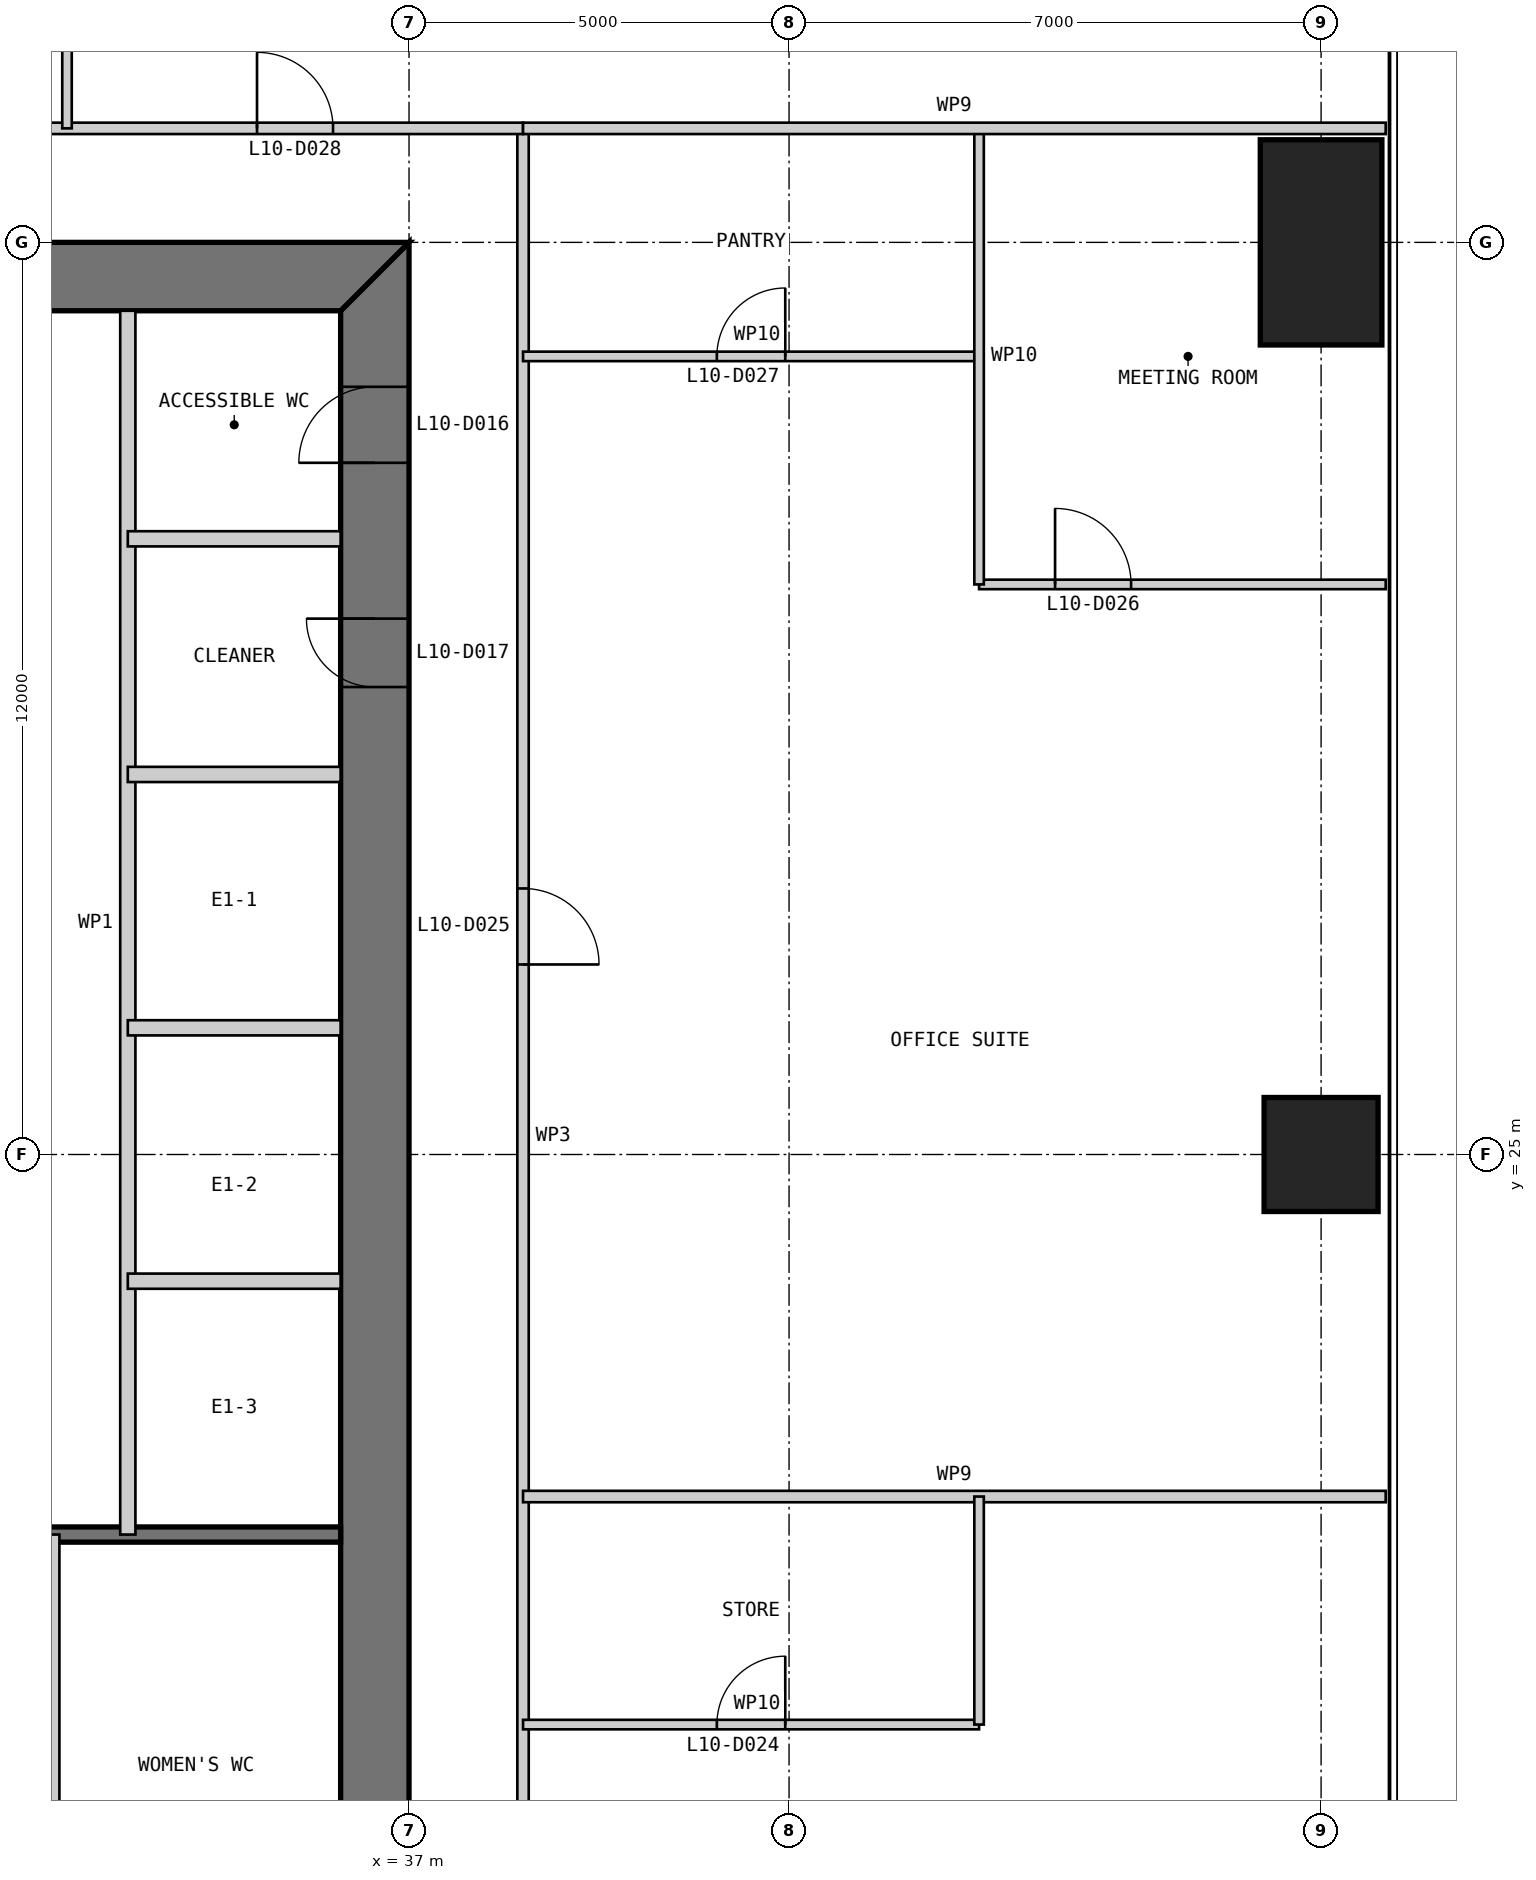
"""IFC4 building model, lengths in metres.
Left out: names, types, materials, properties, quantities, classifications, styles, units other than length and angle.
Written with IfcOpenShell. Run it as: python <this file> out.ifc"""

import sys

from ifc_helpers import new_model, si_unit, direction, frame, frame_2d, origin, origin_2d, place, context, subcontext, project, spatial, polyline, rectangle, outline, extrude, element, fill, save


model = new_model("IFC4")
c1 = context("Model", 3, precision=1e-05, world=origin(), true_north=direction((0.0, 1.0)))
c2 = subcontext(c1, "Body", "Model", "MODEL_VIEW")
j1 = project(units=[si_unit("LENGTHUNIT", "METRE"), si_unit("PLANEANGLEUNIT", "RADIAN")], contexts=[c1])
p1 = place(None, origin())
s1 = spatial("IfcSite", under=j1, at=p1, CompositionType="ELEMENT")
p2 = place(p1, origin())
s2 = spatial("IfcBuilding", under=s1, at=p2, CompositionType="ELEMENT")
p3 = place(p2, frame((0.0, 0.0, 47.0)))
s3 = spatial("IfcBuildingStorey", under=s2, at=p3, CompositionType="ELEMENT", Elevation=47.0)
p4 = place(p3, frame((49.0, 25.0, 0.0), z_axis=(0.0, 0.0, 1.0), x_axis=(1.0, 0.0, 0.0)))
e1 = element("IfcColumn", 1, at=p4, inside=s3, PredefinedType="COLUMN", context=c2, shape_type="SweptSolid", body=[
    extrude(rectangle(XDim=1.5, YDim=1.5, at=origin_2d()), origin(), (0.0, 0.0, 1.0), 4.0),
])
p5 = place(p3, frame((49.0, 37.0, 0.0), z_axis=(0.0, 0.0, 1.0), x_axis=(1.0, 0.0, 0.0)))
e2 = element("IfcColumn", 2, at=p5, inside=s3, PredefinedType="COLUMN", context=c2, shape_type="SweptSolid", body=[
    extrude(rectangle(XDim=1.6, YDim=2.7, at=origin_2d()), origin(), (0.0, 0.0, 1.0), 4.0),
])
p6 = place(p3, frame((36.55, 13.9, 0.0), z_axis=(0.0, 0.0, 1.0), x_axis=(0.0, 1.0, 0.0)))
e3 = element("IfcWall", 3, at=p6, inside=s3, PredefinedType="SHEAR", context=c2, shape_type="SweptSolid", body=[
    extrude(outline(polyline([(-0.9, -0.45), (23.1, -0.45), (22.2, 0.45), (0.0, 0.45), (-0.9, -0.45)])), origin(), (0.0, 0.0, 1.0), 4.0),
])
p7 = place(p6, frame((20.2, 0.0, 0.0)))
e4 = element("IfcOpeningElement", 4, at=p7, cuts=e3, PredefinedType="OPENING", context=c2, shape_type="SweptSolid", body=[
    extrude(rectangle(XDim=1.0, YDim=2.2, at=frame_2d((0.5, 1.1))), frame((0.0, 0.46, 0.0), z_axis=(0.0, -1.0, 0.0), x_axis=(1.0, 0.0, 0.0)), (0.0, 0.0, 1.0), 0.92),
])
p8 = place(p6, frame((17.25, 0.0, 0.0)))
e5 = element("IfcOpeningElement", 5, at=p8, cuts=e3, PredefinedType="OPENING", context=c2, shape_type="SweptSolid", body=[
    extrude(rectangle(XDim=0.9, YDim=2.2, at=frame_2d((0.45, 1.1))), frame((0.0, 0.46, 0.0), z_axis=(0.0, -1.0, 0.0), x_axis=(1.0, 0.0, 0.0)), (0.0, 0.0, 1.0), 0.92),
])
p9 = place(p3, frame((37.0, 36.55, 0.0), z_axis=(0.0, 0.0, 1.0), x_axis=(-1.0, 0.0, 0.0)))
e6 = element("IfcWall", 6, at=p9, inside=s3, PredefinedType="SHEAR", context=c2, shape_type="SweptSolid", body=[
    extrude(outline(polyline([(0.0, -0.45), (24.0, -0.45), (23.1, 0.45), (0.9, 0.45), (0.0, -0.45)])), origin(), (0.0, 0.0, 1.0), 4.0),
])
p10 = place(p9, frame((4.9, 0.0, 0.0)))
e7 = element("IfcOpeningElement", 7, at=p10, cuts=e6, PredefinedType="OPENING", context=c2, shape_type="SweptSolid", body=[
    extrude(rectangle(XDim=1.0, YDim=2.2, at=frame_2d((0.5, 1.1))), frame((0.0, 0.46, 0.0), z_axis=(0.0, -1.0, 0.0), x_axis=(1.0, 0.0, 0.0)), (0.0, 0.0, 1.0), 0.92),
])
p11 = place(p9, frame((8.9, 0.0, 0.0)))
e8 = element("IfcOpeningElement", 8, at=p11, cuts=e6, PredefinedType="OPENING", context=c2, shape_type="SweptSolid", body=[
    extrude(rectangle(XDim=1.1, YDim=2.2, at=frame_2d((0.55, 1.1))), frame((0.0, 0.46, 0.0), z_axis=(0.0, -1.0, 0.0), x_axis=(1.0, 0.0, 0.0)), (0.0, 0.0, 1.0), 0.92),
])
p12 = place(p9, frame((15.05, 0.0, 0.0)))
e9 = element("IfcOpeningElement", 9, at=p12, cuts=e6, PredefinedType="OPENING", context=c2, shape_type="SweptSolid", body=[
    extrude(rectangle(XDim=0.9, YDim=2.2, at=frame_2d((0.45, 1.1))), frame((0.0, 0.46, 0.0), z_axis=(0.0, -1.0, 0.0), x_axis=(1.0, 0.0, 0.0)), (0.0, 0.0, 1.0), 0.92),
])
p13 = place(p9, frame((17.9, 0.0, 0.0)))
e10 = element("IfcOpeningElement", 10, at=p13, cuts=e6, PredefinedType="OPENING", context=c2, shape_type="SweptSolid", body=[
    extrude(rectangle(XDim=1.0, YDim=2.2, at=frame_2d((0.5, 1.1))), frame((0.0, 0.46, 0.0), z_axis=(0.0, -1.0, 0.0), x_axis=(1.0, 0.0, 0.0)), (0.0, 0.0, 1.0), 0.92),
])
p14 = place(p9, frame((21.4, 0.0, 0.0)))
e11 = element("IfcOpeningElement", 11, at=p14, cuts=e6, PredefinedType="OPENING", context=c2, shape_type="SweptSolid", body=[
    extrude(rectangle(XDim=1.0, YDim=2.2, at=frame_2d((0.5, 1.1))), frame((0.0, 0.46, 0.0), z_axis=(0.0, -1.0, 0.0), x_axis=(1.0, 0.0, 0.0)), (0.0, 0.0, 1.0), 0.92),
])
p15 = place(p3, frame((20.3, 20.0, 0.0), z_axis=(0.0, 0.0, 1.0), x_axis=(1.0, 0.0, 0.0)))
e12 = element("IfcWall", 12, at=p15, inside=s3, PredefinedType="SOLIDWALL", context=c2, shape_type="SweptSolid", body=[
    extrude(rectangle(XDim=15.8, YDim=0.2, at=frame_2d((7.9, 0.0))), origin(), (0.0, 0.0, 1.0), 3.8),
])
p16 = place(p3, frame((32.3, 13.9, 0.0), z_axis=(0.0, 0.0, 1.0), x_axis=(0.0, 1.0, 0.0)))
e13 = element("IfcWall", 13, at=p16, inside=s3, PredefinedType="PARTITIONING", context=c2, shape_type="SweptSolid", body=[
    extrude(rectangle(XDim=6.1, YDim=0.2, at=frame_2d((3.05, 0.0))), origin(), (0.0, 0.0, 1.0), 3.8),
])
p17 = place(p3, frame((33.3, 36.1, 0.0), z_axis=(0.0, 0.0, 1.0), x_axis=(0.0, -1.0, 0.0)))
e14 = element("IfcWall", 14, at=p17, inside=s3, PredefinedType="PARTITIONING", context=c2, shape_type="SweptSolid", body=[
    extrude(rectangle(XDim=16.1, YDim=0.2, at=frame_2d((8.05, 0.0))), origin(), (0.0, 0.0, 1.0), 3.8),
])
for number, where, z_axis, x_axis in (
    (15, (36.1, 30.0, 0.0), (0.0, 0.0, 1.0), (-1.0, 0.0, 0.0)),
    (16, (36.1, 26.667, 0.0), (0.0, 0.0, 1.0), (-1.0, 0.0, 0.0)),
    (17, (36.1, 23.333, 0.0), (0.0, 0.0, 1.0), (-1.0, 0.0, 0.0)),
    (18, (36.1, 33.1, 0.0), (0.0, 0.0, 1.0), (-1.0, 0.0, 0.0)),
):
    element("IfcWall", number, at=place(p3, frame(where, z_axis=z_axis, x_axis=x_axis)), inside=s3, PredefinedType="PARTITIONING", context=c2, shape_type="SweptSolid", body=[
        extrude(rectangle(XDim=2.8, YDim=0.2, at=frame_2d((1.4, 0.0))), origin(), (0.0, 0.0, 1.0), 3.8),
    ])
p18 = place(p3, frame((38.5, 11.5, 0.0), z_axis=(0.0, 0.0, 1.0), x_axis=(0.0, 1.0, 0.0)))
e19 = element("IfcWall", 19, at=p18, inside=s3, PredefinedType="PARTITIONING", context=c2, shape_type="SweptSolid", body=[
    extrude(rectangle(XDim=27.0, YDim=0.15, at=frame_2d((13.5, 0.0))), origin(), (0.0, 0.0, 1.0), 3.85),
])
p19 = place(p18, frame((2.5, 0.0, 0.0)))
e20 = element("IfcOpeningElement", 20, at=p19, cuts=e19, PredefinedType="OPENING", context=c2, shape_type="SweptSolid", body=[
    extrude(rectangle(XDim=1.0, YDim=2.2, at=frame_2d((0.5, 1.1))), frame((0.0, 0.085, 0.0), z_axis=(0.0, -1.0, 0.0), x_axis=(1.0, 0.0, 0.0)), (0.0, 0.0, 1.0), 0.17),
])
p20 = place(p18, frame((16.0, 0.0, 0.0)))
e21 = element("IfcOpeningElement", 21, at=p20, cuts=e19, PredefinedType="OPENING", context=c2, shape_type="SweptSolid", body=[
    extrude(rectangle(XDim=1.0, YDim=2.2, at=frame_2d((0.5, 1.1))), frame((0.0, 0.085, 0.0), z_axis=(0.0, -1.0, 0.0), x_axis=(1.0, 0.0, 0.0)), (0.0, 0.0, 1.0), 0.17),
])
p21 = place(p3, frame((44.5, 17.5, 0.0), z_axis=(0.0, 0.0, 1.0), x_axis=(-1.0, 0.0, 0.0)))
e22 = element("IfcWall", 22, at=p21, inside=s3, PredefinedType="PARTITIONING", context=c2, shape_type="SweptSolid", body=[
    extrude(rectangle(XDim=6.0, YDim=0.125, at=frame_2d((3.0, 0.0))), origin(), (0.0, 0.0, 1.0), 3.85),
])
p22 = place(p21, frame((2.55, 0.0, 0.0)))
e23 = element("IfcOpeningElement", 23, at=p22, cuts=e22, PredefinedType="OPENING", context=c2, shape_type="SweptSolid", body=[
    extrude(rectangle(XDim=0.9, YDim=2.2, at=frame_2d((0.45, 1.1))), frame((0.0, 0.073, 0.0), z_axis=(0.0, -1.0, 0.0), x_axis=(1.0, 0.0, 0.0)), (0.0, 0.0, 1.0), 0.145),
])
p23 = place(p3, frame((49.85, 20.5, 0.0), z_axis=(0.0, 0.0, 1.0), x_axis=(-1.0, 0.0, 0.0)))
e24 = element("IfcWall", 24, at=p23, inside=s3, PredefinedType="PARTITIONING", context=c2, shape_type="SweptSolid", body=[
    extrude(rectangle(XDim=11.35, YDim=0.15, at=frame_2d((5.675, 0.0))), origin(), (0.0, 0.0, 1.0), 3.85),
])
p24 = place(p3, frame((49.85, 32.5, 0.0), z_axis=(0.0, 0.0, 1.0), x_axis=(-1.0, 0.0, 0.0)))
e25 = element("IfcWall", 25, at=p24, inside=s3, PredefinedType="PARTITIONING", context=c2, shape_type="SweptSolid", body=[
    extrude(rectangle(XDim=5.35, YDim=0.125, at=frame_2d((2.675, 0.0))), origin(), (0.0, 0.0, 1.0), 3.85),
])
p25 = place(p24, frame((3.35, 0.0, 0.0)))
e26 = element("IfcOpeningElement", 26, at=p25, cuts=e25, PredefinedType="OPENING", context=c2, shape_type="SweptSolid", body=[
    extrude(rectangle(XDim=1.0, YDim=2.2, at=frame_2d((0.5, 1.1))), frame((0.0, 0.073, 0.0), z_axis=(0.0, -1.0, 0.0), x_axis=(1.0, 0.0, 0.0)), (0.0, 0.0, 1.0), 0.145),
])
p26 = place(p3, frame((44.5, 35.5, 0.0), z_axis=(0.0, 0.0, 1.0), x_axis=(-1.0, 0.0, 0.0)))
e27 = element("IfcWall", 27, at=p26, inside=s3, PredefinedType="PARTITIONING", context=c2, shape_type="SweptSolid", body=[
    extrude(rectangle(XDim=6.0, YDim=0.125, at=frame_2d((3.0, 0.0))), origin(), (0.0, 0.0, 1.0), 3.85),
])
p27 = place(p26, frame((2.55, 0.0, 0.0)))
e28 = element("IfcOpeningElement", 28, at=p27, cuts=e27, PredefinedType="OPENING", context=c2, shape_type="SweptSolid", body=[
    extrude(rectangle(XDim=0.9, YDim=2.2, at=frame_2d((0.45, 1.1))), frame((0.0, 0.073, 0.0), z_axis=(0.0, -1.0, 0.0), x_axis=(1.0, 0.0, 0.0)), (0.0, 0.0, 1.0), 0.145),
])
p28 = place(p3, frame((44.5, 17.5, 0.0), z_axis=(0.0, 0.0, 1.0), x_axis=(0.0, 1.0, 0.0)))
e29 = element("IfcWall", 29, at=p28, inside=s3, PredefinedType="PARTITIONING", context=c2, shape_type="SweptSolid", body=[
    extrude(rectangle(XDim=3.0, YDim=0.125, at=frame_2d((1.5, 0.0))), origin(), (0.0, 0.0, 1.0), 3.85),
])
p29 = place(p3, frame((44.5, 32.5, 0.0), z_axis=(0.0, 0.0, 1.0), x_axis=(0.0, 1.0, 0.0)))
e30 = element("IfcWall", 30, at=p29, inside=s3, PredefinedType="PARTITIONING", context=c2, shape_type="SweptSolid", body=[
    extrude(rectangle(XDim=6.0, YDim=0.125, at=frame_2d((3.0, 0.0))), origin(), (0.0, 0.0, 1.0), 3.85),
])
p30 = place(p3, frame((38.5, 38.5, 0.0), z_axis=(0.0, 0.0, 1.0), x_axis=(-1.0, 0.0, 0.0)))
e31 = element("IfcWall", 31, at=p30, inside=s3, PredefinedType="PARTITIONING", context=c2, shape_type="SweptSolid", body=[
    extrude(rectangle(XDim=27.0, YDim=0.15, at=frame_2d((13.5, 0.0))), origin(), (0.0, 0.0, 1.0), 3.85),
])
p31 = place(p30, frame((2.5, 0.0, 0.0)))
e32 = element("IfcOpeningElement", 32, at=p31, cuts=e31, PredefinedType="OPENING", context=c2, shape_type="SweptSolid", body=[
    extrude(rectangle(XDim=1.0, YDim=2.2, at=frame_2d((0.5, 1.1))), frame((0.0, 0.085, 0.0), z_axis=(0.0, -1.0, 0.0), x_axis=(1.0, 0.0, 0.0)), (0.0, 0.0, 1.0), 0.17),
])
p32 = place(p30, frame((16.0, 0.0, 0.0)))
e33 = element("IfcOpeningElement", 33, at=p32, cuts=e31, PredefinedType="OPENING", context=c2, shape_type="SweptSolid", body=[
    extrude(rectangle(XDim=1.0, YDim=2.2, at=frame_2d((0.5, 1.1))), frame((0.0, 0.085, 0.0), z_axis=(0.0, -1.0, 0.0), x_axis=(1.0, 0.0, 0.0)), (0.0, 0.0, 1.0), 0.17),
])
p33 = place(p3, frame((49.85, 38.5, 0.0), z_axis=(0.0, 0.0, 1.0), x_axis=(-1.0, 0.0, 0.0)))
e34 = element("IfcWall", 34, at=p33, inside=s3, PredefinedType="PARTITIONING", context=c2, shape_type="SweptSolid", body=[
    extrude(rectangle(XDim=11.35, YDim=0.15, at=frame_2d((5.675, 0.0))), origin(), (0.0, 0.0, 1.0), 3.85),
])
p34 = place(p3, frame((32.5, 44.5, 0.0), z_axis=(0.0, 0.0, 1.0), x_axis=(0.0, -1.0, 0.0)))
e35 = element("IfcWall", 35, at=p34, inside=s3, PredefinedType="PARTITIONING", context=c2, shape_type="SweptSolid", body=[
    extrude(rectangle(XDim=6.0, YDim=0.125, at=frame_2d((3.0, 0.0))), origin(), (0.0, 0.0, 1.0), 3.85),
])
p35 = place(p34, frame((2.55, 0.0, 0.0)))
e36 = element("IfcOpeningElement", 36, at=p35, cuts=e35, PredefinedType="OPENING", context=c2, shape_type="SweptSolid", body=[
    extrude(rectangle(XDim=0.9, YDim=2.2, at=frame_2d((0.45, 1.1))), frame((0.0, 0.073, 0.0), z_axis=(0.0, -1.0, 0.0), x_axis=(1.0, 0.0, 0.0)), (0.0, 0.0, 1.0), 0.145),
])
p36 = place(p7, origin())
e37 = element("IfcDoor", 37, at=p36, inside=s3, OperationType="SINGLE_SWING_LEFT", PredefinedType="DOOR", context=c2, shape_type="SweptSolid", body=[
    extrude(rectangle(XDim=1.0, YDim=2.2, at=frame_2d((0.5, 1.1))), frame((0.0, 0.025, 0.0), z_axis=(0.0, -1.0, 0.0), x_axis=(1.0, 0.0, 0.0)), (0.0, 0.0, 1.0), 0.05),
    extrude(outline(polyline([(0.0, 0.0), (0.04, 0.0), (0.04, 2.16), (0.96, 2.16), (0.96, 0.0), (1.0, 0.0), (1.0, 2.2), (0.0, 2.2), (0.0, 0.0)])), frame((0.0, 0.3, 0.0), z_axis=(0.0, -1.0, 0.0), x_axis=(1.0, 0.0, 0.0)), (0.0, 0.0, 1.0), 0.6),
])
fill(e4, e37)
p37 = place(p8, origin())
e38 = element("IfcDoor", 38, at=p37, inside=s3, OperationType="SINGLE_SWING_RIGHT", PredefinedType="DOOR", context=c2, shape_type="SweptSolid", body=[
    extrude(rectangle(XDim=0.9, YDim=2.2, at=frame_2d((0.45, 1.1))), frame((0.0, 0.025, 0.0), z_axis=(0.0, -1.0, 0.0), x_axis=(1.0, 0.0, 0.0)), (0.0, 0.0, 1.0), 0.05),
    extrude(outline(polyline([(0.0, 0.0), (0.04, 0.0), (0.04, 2.16), (0.86, 2.16), (0.86, 0.0), (0.9, 0.0), (0.9, 2.2), (0.0, 2.2), (0.0, 0.0)])), frame((0.0, 0.3, 0.0), z_axis=(0.0, -1.0, 0.0), x_axis=(1.0, 0.0, 0.0)), (0.0, 0.0, 1.0), 0.6),
])
fill(e5, e38)
p38 = place(p22, frame((0.9, 0.0, 0.0), z_axis=(0.0, 0.0, 1.0), x_axis=(-1.0, 0.0, 0.0)))
e39 = element("IfcDoor", 39, at=p38, inside=s3, OperationType="SINGLE_SWING_RIGHT", PredefinedType="DOOR", context=c2, shape_type="SweptSolid", body=[
    extrude(rectangle(XDim=0.9, YDim=2.2, at=frame_2d((0.45, 1.1))), frame((0.0, 0.025, 0.0), z_axis=(0.0, -1.0, 0.0), x_axis=(1.0, 0.0, 0.0)), (0.0, 0.0, 1.0), 0.05),
])
fill(e23, e39)
p39 = place(p20, frame((1.0, 0.0, 0.0), z_axis=(0.0, 0.0, 1.0), x_axis=(-1.0, 0.0, 0.0)))
e40 = element("IfcDoor", 40, at=p39, inside=s3, OperationType="SINGLE_SWING_RIGHT", PredefinedType="DOOR", context=c2, shape_type="SweptSolid", body=[
    extrude(rectangle(XDim=1.0, YDim=2.2, at=frame_2d((0.5, 1.1))), frame((0.0, 0.025, 0.0), z_axis=(0.0, -1.0, 0.0), x_axis=(1.0, 0.0, 0.0)), (0.0, 0.0, 1.0), 0.05),
])
fill(e21, e40)
p40 = place(p25, frame((1.0, 0.0, 0.0), z_axis=(0.0, 0.0, 1.0), x_axis=(-1.0, 0.0, 0.0)))
e41 = element("IfcDoor", 41, at=p40, inside=s3, OperationType="SINGLE_SWING_LEFT", PredefinedType="DOOR", context=c2, shape_type="SweptSolid", body=[
    extrude(rectangle(XDim=1.0, YDim=2.2, at=frame_2d((0.5, 1.1))), frame((0.0, 0.025, 0.0), z_axis=(0.0, -1.0, 0.0), x_axis=(1.0, 0.0, 0.0)), (0.0, 0.0, 1.0), 0.05),
])
fill(e26, e41)
p41 = place(p27, frame((0.9, 0.0, 0.0), z_axis=(0.0, 0.0, 1.0), x_axis=(-1.0, 0.0, 0.0)))
e42 = element("IfcDoor", 42, at=p41, inside=s3, OperationType="SINGLE_SWING_RIGHT", PredefinedType="DOOR", context=c2, shape_type="SweptSolid", body=[
    extrude(rectangle(XDim=0.9, YDim=2.2, at=frame_2d((0.45, 1.1))), frame((0.0, 0.025, 0.0), z_axis=(0.0, -1.0, 0.0), x_axis=(1.0, 0.0, 0.0)), (0.0, 0.0, 1.0), 0.05),
])
fill(e28, e42)
p42 = place(p31, frame((1.0, 0.0, 0.0), z_axis=(0.0, 0.0, 1.0), x_axis=(-1.0, 0.0, 0.0)))
e43 = element("IfcDoor", 43, at=p42, inside=s3, OperationType="SINGLE_SWING_LEFT", PredefinedType="DOOR", context=c2, shape_type="SweptSolid", body=[
    extrude(rectangle(XDim=1.0, YDim=2.2, at=frame_2d((0.5, 1.1))), frame((0.0, 0.025, 0.0), z_axis=(0.0, -1.0, 0.0), x_axis=(1.0, 0.0, 0.0)), (0.0, 0.0, 1.0), 0.05),
])
fill(e32, e43)
save(model, sys.argv[1])
